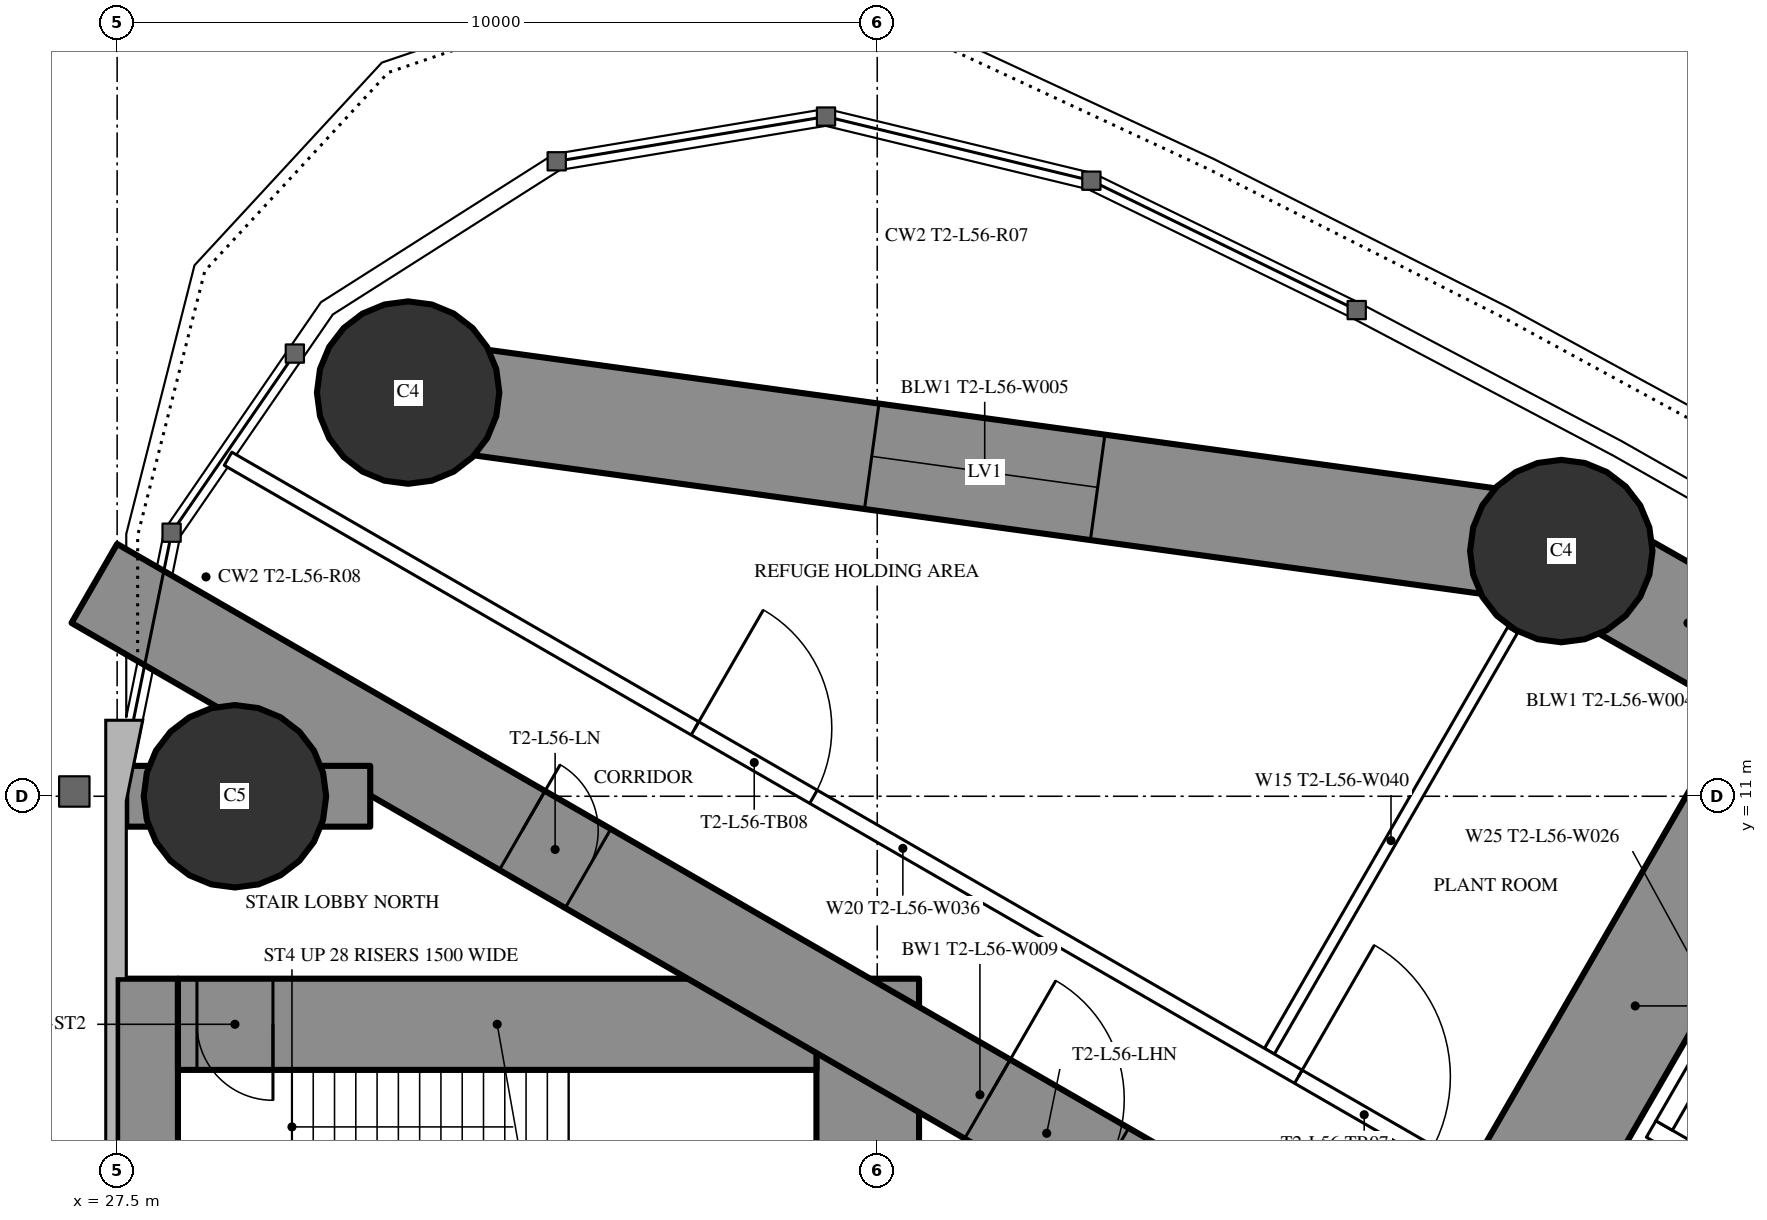
"""IFC4 building model, lengths in metres.
Left out: names, types, materials, properties, quantities, classifications, styles, units other than length and angle.
Written with IfcOpenShell. Run it as: python <this file> out.ifc"""

import sys

from ifc_helpers import new_model, si_unit, direction, frame, frame_2d, origin, origin_2d, place, context, subcontext, project, spatial, rectangle, circle, hollow_circle, extrude, element, fill, save


model = new_model("IFC4")
c1 = context("Model", 3, precision=1e-05, world=origin(), true_north=direction((0.0, 1.0)))
c2 = subcontext(c1, "Body", "Model", "MODEL_VIEW")
j1 = project(units=[si_unit("LENGTHUNIT", "METRE"), si_unit("PLANEANGLEUNIT", "RADIAN")], contexts=[c1])
p1 = place(None, origin())
s1 = spatial("IfcSite", under=j1, at=p1, CompositionType="ELEMENT")
p2 = place(p1, origin())
s2 = spatial("IfcBuilding", under=s1, at=p2, CompositionType="ELEMENT")
p3 = place(p2, frame((0.0, 0.0, 210.3)))
s3 = spatial("IfcBuildingStorey", under=s2, at=p3, CompositionType="ELEMENT", Elevation=210.3)
p4 = place(p3, frame((31.328, 16.311, 0.0), z_axis=(0.0, 0.0, 1.0), x_axis=(1.0, 0.0, 0.0)))
e1 = element("IfcColumn", 1, at=p4, inside=s3, PredefinedType="COLUMN", context=c2, shape_type="SweptSolid", body=[
    extrude(circle(Radius=1.2, at=origin_2d()), origin(), (0.0, 0.0, 1.0), 5.0),
])
p5 = place(p3, frame((29.05, 11.0, 0.0), z_axis=(0.0, 0.0, 1.0), x_axis=(1.0, 0.0, 0.0)))
e2 = element("IfcColumn", 2, at=p5, inside=s3, PredefinedType="COLUMN", context=c2, shape_type="SweptSolid", body=[
    extrude(hollow_circle(Radius=1.2, WallThickness=0.09, at=origin_2d()), origin(), (0.0, 0.0, 1.0), 5.0),
])
p6 = place(p3, frame((46.499, 14.226, 0.0), z_axis=(0.0, 0.0, 1.0), x_axis=(1.0, 0.0, 0.0)))
e3 = element("IfcColumn", 3, at=p6, inside=s3, PredefinedType="COLUMN", context=c2, shape_type="SweptSolid", body=[
    extrude(circle(Radius=1.2, at=origin_2d()), origin(), (0.0, 0.0, 1.0), 5.0),
])
p7 = place(p3, frame((27.9, -8.6, 0.0), z_axis=(0.0, 0.0, 1.0), x_axis=(0.0, 1.0, 0.0)))
e4 = element("IfcWall", 4, at=p7, inside=s3, PredefinedType="SHEAR", context=c2, shape_type="SweptSolid", body=[
    extrude(rectangle(XDim=17.2, YDim=0.8, at=frame_2d((8.6, 0.0))), origin(), (0.0, 0.0, 1.0), 5.0),
])
p8 = place(p7, frame((9.35, 0.0, 0.0)))
e5 = element("IfcOpeningElement", 5, at=p8, cuts=e4, PredefinedType="OPENING", context=c2, shape_type="SweptSolid", body=[
    extrude(rectangle(XDim=0.9, YDim=2.2, at=frame_2d((0.45, 1.1))), frame((0.0, 0.41, 0.0), z_axis=(0.0, -1.0, 0.0), x_axis=(1.0, 0.0, 0.0)), (0.0, 0.0, 1.0), 0.82),
])
p9 = place(p3, frame((37.375, -8.6, 0.0), z_axis=(0.0, 0.0, 1.0), x_axis=(0.0, 1.0, 0.0)))
e6 = element("IfcWall", 6, at=p9, inside=s3, PredefinedType="SHEAR", context=c2, shape_type="SweptSolid", body=[
    extrude(rectangle(XDim=17.2, YDim=1.35, at=frame_2d((8.6, 0.0))), origin(), (0.0, 0.0, 1.0), 5.0),
])
p10 = place(p9, frame((7.7, 0.0, 0.0)))
e7 = element("IfcOpeningElement", 7, at=p10, cuts=e6, PredefinedType="OPENING", context=c2, shape_type="SweptSolid", body=[
    extrude(rectangle(XDim=1.8, YDim=2.2, at=frame_2d((0.9, 1.1))), frame((0.0, 0.685, 0.0), z_axis=(0.0, -1.0, 0.0), x_axis=(1.0, 0.0, 0.0)), (0.0, 0.0, 1.0), 1.37),
])
p11 = place(p3, frame((28.3, 8.0, 0.0), z_axis=(0.0, 0.0, 1.0), x_axis=(1.0, 0.0, 0.0)))
e8 = element("IfcWall", 8, at=p11, inside=s3, PredefinedType="SHEAR", context=c2, shape_type="SweptSolid", body=[
    extrude(rectangle(XDim=8.4, YDim=1.2, at=frame_2d((4.2, 0.0))), origin(), (0.0, 0.0, 1.0), 5.0),
])
p12 = place(p11, frame((0.25, 0.0, 0.0)))
e9 = element("IfcOpeningElement", 9, at=p12, cuts=e8, PredefinedType="OPENING", context=c2, shape_type="SweptSolid", body=[
    extrude(rectangle(XDim=1.0, YDim=2.2, at=frame_2d((0.5, 1.1))), frame((0.0, 0.61, 0.0), z_axis=(0.0, -1.0, 0.0), x_axis=(1.0, 0.0, 0.0)), (0.0, 0.0, 1.0), 1.22),
])
p13 = place(p3, frame((27.2, 13.8, 0.0), z_axis=(0.0, 0.0, 1.0), x_axis=(0.866024515034, -0.500001539357, 0.0)))
e10 = element("IfcWall", 10, at=p13, inside=s3, PredefinedType="SHEAR", context=c2, shape_type="SweptSolid", body=[
    extrude(rectangle(XDim=26.907, YDim=1.2, at=frame_2d((13.454, 0.0))), origin(), (0.0, 0.0, 1.0), 5.0),
])
p14 = place(p13, frame((6.5, 0.0, 0.0)))
e11 = element("IfcOpeningElement", 11, at=p14, cuts=e10, PredefinedType="OPENING", context=c2, shape_type="SweptSolid", body=[
    extrude(rectangle(XDim=1.0, YDim=2.2, at=frame_2d((0.5, 1.1))), frame((0.0, 0.61, 0.0), z_axis=(0.0, -1.0, 0.0), x_axis=(1.0, 0.0, 0.0)), (0.0, 0.0, 1.0), 1.22),
])
p15 = place(p13, frame((13.568, 0.0, 0.0)))
e12 = element("IfcOpeningElement", 12, at=p15, cuts=e10, PredefinedType="OPENING", context=c2, shape_type="SweptSolid", body=[
    extrude(rectangle(XDim=1.8, YDim=2.2, at=frame_2d((0.9, 1.1))), frame((0.0, 0.61, 0.0), z_axis=(0.0, -1.0, 0.0), x_axis=(1.0, 0.0, 0.0)), (0.0, 0.0, 1.0), 1.22),
])
p16 = place(p3, frame((27.62, 11.0, 0.0), z_axis=(0.0, 0.0, 1.0), x_axis=(1.0, 0.0, 0.0)))
e13 = element("IfcWall", 13, at=p16, inside=s3, PredefinedType="SHEAR", context=c2, shape_type="SweptSolid", body=[
    extrude(rectangle(XDim=3.209, YDim=0.8, at=frame_2d((1.605, 0.0))), origin(), (0.0, 0.0, 1.0), 5.0),
])
p17 = place(p3, frame((45.111, 4.152, 0.0), z_axis=(0.0, 0.0, 1.0), x_axis=(0.499986466662, 0.86603321712, 0.0)))
e14 = element("IfcWall", 14, at=p17, inside=s3, PredefinedType="SHEAR", context=c2, shape_type="SweptSolid", body=[
    extrude(rectangle(XDim=9.446, YDim=1.6, at=frame_2d((4.723, 0.0))), origin(), (0.0, 0.0, 1.0), 5.0),
])
p18 = place(p17, frame((0.3, 0.0, 0.0)))
e15 = element("IfcOpeningElement", 15, at=p18, cuts=e14, PredefinedType="OPENING", context=c2, shape_type="SweptSolid", body=[
    extrude(rectangle(XDim=1.0, YDim=2.2, at=frame_2d((0.5, 1.1))), frame((0.0, 0.81, 0.0), z_axis=(0.0, -1.0, 0.0), x_axis=(1.0, 0.0, 0.0)), (0.0, 0.0, 1.0), 1.62),
])
p19 = place(p3, frame((49.834, 12.332, 0.0), z_axis=(0.0, 0.0, 1.0), x_axis=(-0.869560321562, 0.493826738001, 0.0)))
e16 = element("IfcWall", 16, at=p19, inside=s3, PredefinedType="SHEAR", context=c2, shape_type="SweptSolid", body=[
    extrude(rectangle(XDim=3.835, YDim=1.4, at=frame_2d((1.917, 0.0))), origin(), (0.0, 0.0, 1.0), 5.0),
])
p20 = place(p3, frame((46.499, 14.226, 0.0), z_axis=(0.0, 0.0, 1.0), x_axis=(-0.990685830783, 0.13616748762, 0.0)))
e17 = element("IfcWall", 17, at=p20, inside=s3, PredefinedType="SHEAR", context=c2, shape_type="SweptSolid", body=[
    extrude(rectangle(XDim=15.313, YDim=1.4, at=frame_2d((7.657, 0.0))), origin(), (0.0, 0.0, 1.0), 5.0),
])
p21 = place(p20, frame((6.157, 0.0, 0.6)))
e18 = element("IfcOpeningElement", 18, at=p21, cuts=e17, PredefinedType="OPENING", context=c2, shape_type="SweptSolid", body=[
    extrude(rectangle(XDim=3.0, YDim=1.2, at=frame_2d((1.5, 0.6))), frame((0.0, 0.71, 0.0), z_axis=(0.0, -1.0, 0.0), x_axis=(1.0, 0.0, 0.0)), (0.0, 0.0, 1.0), 1.42),
])
p22 = place(p3, frame((42.66, 7.646, 0.0), z_axis=(0.0, 0.0, 1.0), x_axis=(0.499996592859, 0.866027370889, 0.0)))
e19 = element("IfcWall", 19, at=p22, inside=s3, PredefinedType="PARTITIONING", context=c2, shape_type="SweptSolid", body=[
    extrude(rectangle(XDim=6.398, YDim=0.15, at=frame_2d((3.199, 0.0))), origin(), (0.0, 0.0, 1.0), 3.85),
])
p23 = place(p3, frame((28.959, 15.44, 0.0), z_axis=(0.0, 0.0, 1.0), x_axis=(0.866028936079, -0.499993881836, 0.0)))
e20 = element("IfcWall", 20, at=p23, inside=s3, PredefinedType="PARTITIONING", context=c2, shape_type="SweptSolid", body=[
    extrude(rectangle(XDim=20.503, YDim=0.2, at=frame_2d((10.251, 0.0))), origin(), (0.0, 0.0, 1.0), 4.75),
])
p24 = place(p23, frame((16.26, 0.0, 0.0)))
e21 = element("IfcOpeningElement", 21, at=p24, cuts=e20, PredefinedType="OPENING", context=c2, shape_type="SweptSolid", body=[
    extrude(rectangle(XDim=2.0, YDim=2.4, at=frame_2d((1.0, 1.2))), frame((0.0, 0.11, 0.0), z_axis=(0.0, -1.0, 0.0), x_axis=(1.0, 0.0, 0.0)), (0.0, 0.0, 1.0), 0.22),
])
p25 = place(p23, frame((7.094, 0.0, 0.0)))
e22 = element("IfcOpeningElement", 22, at=p25, cuts=e20, PredefinedType="OPENING", context=c2, shape_type="SweptSolid", body=[
    extrude(rectangle(XDim=1.8, YDim=2.2, at=frame_2d((0.9, 1.1))), frame((0.0, 0.11, 0.0), z_axis=(0.0, -1.0, 0.0), x_axis=(1.0, 0.0, 0.0)), (0.0, 0.0, 1.0), 0.22),
])
p26 = place(p3, frame((47.681, 6.622, 0.0), z_axis=(0.0, 0.0, 1.0), x_axis=(0.86603344179, -0.499986077507, 0.0)))
e23 = element("IfcWall", 23, at=p26, inside=s3, PredefinedType="PARTITIONING", context=c2, shape_type="SweptSolid", body=[
    extrude(rectangle(XDim=6.6, YDim=0.25, at=frame_2d((3.3, 0.0))), origin(), (0.0, 0.0, 1.0), 4.75),
])
p27 = place(p3, frame((47.852, 6.668, 0.0), z_axis=(0.0, 0.0, 1.0), x_axis=(0.499929347863, 0.866066190972, 0.0)))
e24 = element("IfcWall", 24, at=p27, inside=s3, PredefinedType="PARTITIONING", context=c2, shape_type="SweptSolid", body=[
    extrude(rectangle(XDim=3.201, YDim=0.25, at=frame_2d((1.6, 0.0))), origin(), (0.0, 0.0, 1.0), 4.75),
])
p28 = place(p21, origin())
e25 = element("IfcWindow", 25, at=p28, inside=s3, PartitioningType="SINGLE_PANEL", PredefinedType="WINDOW", context=c2, shape_type="SweptSolid", body=[
    extrude(rectangle(XDim=3.0, YDim=1.2, at=frame_2d((1.5, 0.6))), frame((0.0, 0.03, 0.0), z_axis=(0.0, -1.0, 0.0), x_axis=(1.0, 0.0, 0.0)), (0.0, 0.0, 1.0), 0.06),
])
fill(e18, e25)
p29 = place(p24, origin())
e26 = element("IfcDoor", 26, at=p29, inside=s3, OperationType="DOUBLE_DOOR_SINGLE_SWING", PredefinedType="DOOR", context=c2, shape_type="SweptSolid", body=[
    extrude(rectangle(XDim=2.0, YDim=2.4, at=frame_2d((1.0, 1.2))), frame((0.0, 0.025, 0.0), z_axis=(0.0, -1.0, 0.0), x_axis=(1.0, 0.0, 0.0)), (0.0, 0.0, 1.0), 0.05),
])
fill(e21, e26)
p30 = place(p25, origin())
e27 = element("IfcDoor", 27, at=p30, inside=s3, OperationType="DOUBLE_DOOR_SINGLE_SWING", PredefinedType="DOOR", context=c2, shape_type="SweptSolid", body=[
    extrude(rectangle(XDim=1.8, YDim=2.2, at=frame_2d((0.9, 1.1))), frame((0.0, 0.025, 0.0), z_axis=(0.0, -1.0, 0.0), x_axis=(1.0, 0.0, 0.0)), (0.0, 0.0, 1.0), 0.05),
])
fill(e22, e27)
p31 = place(p14, origin())
e28 = element("IfcDoor", 28, at=p31, inside=s3, OperationType="SINGLE_SWING_LEFT", PredefinedType="DOOR", context=c2, shape_type="SweptSolid", body=[
    extrude(rectangle(XDim=1.0, YDim=2.2, at=frame_2d((0.5, 1.1))), frame((0.0, 0.025, 0.0), z_axis=(0.0, -1.0, 0.0), x_axis=(1.0, 0.0, 0.0)), (0.0, 0.0, 1.0), 0.05),
])
fill(e11, e28)
p32 = place(p15, origin())
e29 = element("IfcDoor", 29, at=p32, inside=s3, OperationType="DOUBLE_DOOR_SINGLE_SWING", PredefinedType="DOOR", context=c2, shape_type="SweptSolid", body=[
    extrude(rectangle(XDim=1.8, YDim=2.2, at=frame_2d((0.9, 1.1))), frame((0.0, 0.025, 0.0), z_axis=(0.0, -1.0, 0.0), x_axis=(1.0, 0.0, 0.0)), (0.0, 0.0, 1.0), 0.05),
])
fill(e12, e29)
p33 = place(p12, origin())
e30 = element("IfcDoor", 30, at=p33, inside=s3, OperationType="SINGLE_SWING_RIGHT", PredefinedType="DOOR", context=c2, shape_type="SweptSolid", body=[
    extrude(rectangle(XDim=1.0, YDim=2.2, at=frame_2d((0.5, 1.1))), frame((0.0, 0.025, 0.0), z_axis=(0.0, -1.0, 0.0), x_axis=(1.0, 0.0, 0.0)), (0.0, 0.0, 1.0), 0.05),
])
fill(e9, e30)
save(model, sys.argv[1])
